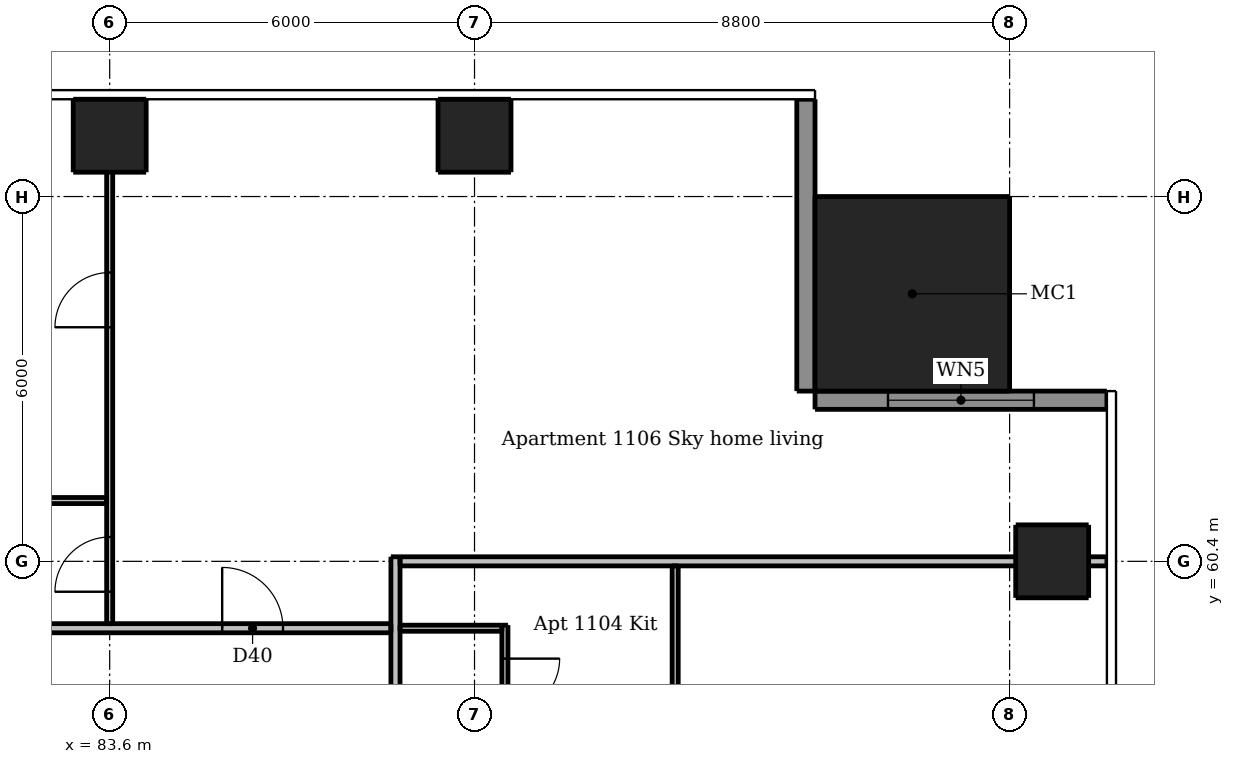
"""IFC4 building model, lengths in metres.
Left out: names, types, materials, properties, quantities, classifications, styles, units other than length and angle.
Written with IfcOpenShell. Run it as: python <this file> out.ifc"""

import sys

from ifc_helpers import new_model, si_unit, direction, frame, frame_2d, origin, origin_2d, place, context, subcontext, project, spatial, rectangle, extrude, element, fill, save


model = new_model("IFC4")
c1 = context("Model", 3, precision=1e-05, world=origin(), true_north=direction((0.0, 1.0)))
c2 = subcontext(c1, "Body", "Model", "MODEL_VIEW")
j1 = project(units=[si_unit("LENGTHUNIT", "METRE"), si_unit("PLANEANGLEUNIT", "RADIAN")], contexts=[c1])
p1 = place(None, origin())
s1 = spatial("IfcSite", under=j1, at=p1, CompositionType="ELEMENT")
p2 = place(p1, origin())
s2 = spatial("IfcBuilding", under=s1, at=p2, CompositionType="ELEMENT")
p3 = place(p2, frame((0.0, 0.0, 43.3)))
s3 = spatial("IfcBuildingStorey", under=s2, at=p3, CompositionType="ELEMENT", Elevation=43.3)
for number, where, z_axis, x_axis in (
    (1, (99.1, 60.4, 0.0), (0.0, 0.0, 1.0), (1.0, 0.0, 0.0)),
    (2, (83.6, 67.4, 0.0), (0.0, 0.0, 1.0), (1.0, 0.0, 0.0)),
    (3, (89.6, 67.4, 0.0), (0.0, 0.0, 1.0), (1.0, 0.0, 0.0)),
):
    element("IfcColumn", number, at=place(p3, frame(where, z_axis=z_axis, x_axis=x_axis)), inside=s3, PredefinedType="COLUMN", context=c2, shape_type="SweptSolid", body=[
        extrude(rectangle(XDim=1.2, YDim=1.2, at=origin_2d()), origin(), (0.0, 0.0, 1.0), 3.05),
    ])
p4 = place(p3, frame((96.8, 64.8, 0.0), z_axis=(0.0, 0.0, 1.0), x_axis=(1.0, 0.0, 0.0)))
e4 = element("IfcColumn", 4, at=p4, inside=s3, PredefinedType="COLUMN", context=c2, shape_type="SweptSolid", body=[
    extrude(rectangle(XDim=3.2, YDim=3.2, at=origin_2d()), origin(), (0.0, 0.0, 1.0), 3.3),
])
p5 = place(p3, frame((100.0, 63.05, 0.0), z_axis=(0.0, 0.0, 1.0), x_axis=(-1.0, 0.0, 0.0)))
e5 = element("IfcWall", 5, at=p5, inside=s3, PredefinedType="SOLIDWALL", context=c2, shape_type="SweptSolid", body=[
    extrude(rectangle(XDim=4.8, YDim=0.3, at=frame_2d((2.4, 0.0))), origin(), (0.0, 0.0, 1.0), 3.05),
])
p6 = place(p5, frame((1.2, 0.0, 0.15)))
e6 = element("IfcOpeningElement", 6, at=p6, cuts=e5, PredefinedType="OPENING", context=c2, shape_type="SweptSolid", body=[
    extrude(rectangle(XDim=2.4, YDim=2.1, at=frame_2d((1.2, 1.05))), frame((0.0, 0.16, 0.0), z_axis=(0.0, -1.0, 0.0), x_axis=(1.0, 0.0, 0.0)), (0.0, 0.0, 1.0), 0.32),
])
p7 = place(p3, frame((95.05, 63.2, 0.0), z_axis=(0.0, 0.0, 1.0), x_axis=(0.0, 1.0, 0.0)))
e7 = element("IfcWall", 7, at=p7, inside=s3, PredefinedType="SOLIDWALL", context=c2, shape_type="SweptSolid", body=[
    extrude(rectangle(XDim=4.8, YDim=0.3, at=frame_2d((2.4, 0.0))), origin(), (0.0, 0.0, 1.0), 3.05),
])
p8 = place(p3, frame((83.6, 59.375, 0.0), z_axis=(0.0, 0.0, 1.0), x_axis=(0.0, 1.0, 0.0)))
e8 = element("IfcWall", 8, at=p8, inside=s3, PredefinedType="PARTITIONING", context=c2, shape_type="SweptSolid", body=[
    extrude(rectangle(XDim=8.625, YDim=0.1, at=frame_2d((4.312, 0.0))), origin(), (0.0, 0.0, 1.0), 2.516),
])
p9 = place(p8, frame((0.525, 0.0, 0.0)))
e9 = element("IfcOpeningElement", 9, at=p9, cuts=e8, PredefinedType="OPENING", context=c2, shape_type="SweptSolid", body=[
    extrude(rectangle(XDim=0.9, YDim=2.1, at=frame_2d((0.45, 1.05))), frame((0.0, 0.06, 0.0), z_axis=(0.0, -1.0, 0.0), x_axis=(1.0, 0.0, 0.0)), (0.0, 0.0, 1.0), 0.12),
])
p10 = place(p8, frame((4.875, 0.0, 0.0)))
e10 = element("IfcOpeningElement", 10, at=p10, cuts=e8, PredefinedType="OPENING", context=c2, shape_type="SweptSolid", body=[
    extrude(rectangle(XDim=0.9, YDim=2.1, at=frame_2d((0.45, 1.05))), frame((0.0, 0.06, 0.0), z_axis=(0.0, -1.0, 0.0), x_axis=(1.0, 0.0, 0.0)), (0.0, 0.0, 1.0), 0.12),
])
p11 = place(p3, frame((90.1, 59.35, 0.0), z_axis=(0.0, 0.0, 1.0), x_axis=(0.0, -1.0, 0.0)))
e11 = element("IfcWall", 11, at=p11, inside=s3, PredefinedType="PARTITIONING", context=c2, shape_type="SweptSolid", body=[
    extrude(rectangle(XDim=19.775, YDim=0.1, at=frame_2d((9.888, 0.0))), origin(), (0.0, 0.0, 1.0), 3.05),
])
p12 = place(p11, frame((4.45, 0.0, 0.0)))
e12 = element("IfcOpeningElement", 12, at=p12, cuts=e11, PredefinedType="OPENING", context=c2, shape_type="SweptSolid", body=[
    extrude(rectangle(XDim=0.9, YDim=2.1, at=frame_2d((0.45, 1.05))), frame((0.0, 0.06, 0.0), z_axis=(0.0, -1.0, 0.0), x_axis=(1.0, 0.0, 0.0)), (0.0, 0.0, 1.0), 0.12),
])
p13 = place(p11, frame((0.55, 0.0, 0.0)))
e13 = element("IfcOpeningElement", 13, at=p13, cuts=e11, PredefinedType="OPENING", context=c2, shape_type="SweptSolid", body=[
    extrude(rectangle(XDim=0.9, YDim=2.1, at=frame_2d((0.45, 1.05))), frame((0.0, 0.06, 0.0), z_axis=(0.0, -1.0, 0.0), x_axis=(1.0, 0.0, 0.0)), (0.0, 0.0, 1.0), 0.12),
])
p14 = place(p11, frame((17.6, 0.0, 0.0)))
e14 = element("IfcOpeningElement", 14, at=p14, cuts=e11, PredefinedType="OPENING", context=c2, shape_type="SweptSolid", body=[
    extrude(rectangle(XDim=0.9, YDim=2.1, at=frame_2d((0.45, 1.05))), frame((0.0, 0.06, 0.0), z_axis=(0.0, -1.0, 0.0), x_axis=(1.0, 0.0, 0.0)), (0.0, 0.0, 1.0), 0.12),
])
p15 = place(p11, frame((11.6, 0.0, 0.0)))
e15 = element("IfcOpeningElement", 15, at=p15, cuts=e11, PredefinedType="OPENING", context=c2, shape_type="SweptSolid", body=[
    extrude(rectangle(XDim=0.9, YDim=2.1, at=frame_2d((0.45, 1.05))), frame((0.0, 0.06, 0.0), z_axis=(0.0, -1.0, 0.0), x_axis=(1.0, 0.0, 0.0)), (0.0, 0.0, 1.0), 0.12),
])
p16 = place(p11, frame((14.65, 0.0, 0.0)))
e16 = element("IfcOpeningElement", 16, at=p16, cuts=e11, PredefinedType="OPENING", context=c2, shape_type="SweptSolid", body=[
    extrude(rectangle(XDim=0.8, YDim=2.1, at=frame_2d((0.4, 1.05))), frame((0.0, 0.06, 0.0), z_axis=(0.0, -1.0, 0.0), x_axis=(1.0, 0.0, 0.0)), (0.0, 0.0, 1.0), 0.12),
])
p17 = place(p11, frame((8.65, 0.0, 0.0)))
e17 = element("IfcOpeningElement", 17, at=p17, cuts=e11, PredefinedType="OPENING", context=c2, shape_type="SweptSolid", body=[
    extrude(rectangle(XDim=0.8, YDim=2.1, at=frame_2d((0.4, 1.05))), frame((0.0, 0.06, 0.0), z_axis=(0.0, -1.0, 0.0), x_axis=(1.0, 0.0, 0.0)), (0.0, 0.0, 1.0), 0.12),
])
p18 = place(p3, frame((92.9, 57.35, 0.0), z_axis=(0.0, 0.0, 1.0), x_axis=(0.0, 1.0, 0.0)))
e18 = element("IfcWall", 18, at=p18, inside=s3, PredefinedType="PARTITIONING", context=c2, shape_type="SweptSolid", body=[
    extrude(rectangle(XDim=2.975, YDim=0.1, at=frame_2d((1.487, 0.0))), origin(), (0.0, 0.0, 1.0), 3.05),
])
p19 = place(p3, frame((83.55, 61.4, 0.0), z_axis=(0.0, 0.0, 1.0), x_axis=(-1.0, 0.0, 0.0)))
e19 = element("IfcWall", 19, at=p19, inside=s3, PredefinedType="PARTITIONING", context=c2, shape_type="SweptSolid", body=[
    extrude(rectangle(XDim=5.875, YDim=0.1, at=frame_2d((2.938, 0.0))), origin(), (0.0, 0.0, 1.0), 3.05),
])
p20 = place(p19, frame((3.75, 0.0, 0.0)))
e20 = element("IfcOpeningElement", 20, at=p20, cuts=e19, PredefinedType="OPENING", context=c2, shape_type="SweptSolid", body=[
    extrude(rectangle(XDim=0.8, YDim=2.1, at=frame_2d((0.4, 1.05))), frame((0.0, 0.06, 0.0), z_axis=(0.0, -1.0, 0.0), x_axis=(1.0, 0.0, 0.0)), (0.0, 0.0, 1.0), 0.12),
])
p21 = place(p3, frame((88.375, 59.3, 0.0), z_axis=(0.0, 0.0, 1.0), x_axis=(1.0, 0.0, 0.0)))
e21 = element("IfcWall", 21, at=p21, inside=s3, PredefinedType="PARTITIONING", context=c2, shape_type="SweptSolid", body=[
    extrude(rectangle(XDim=1.675, YDim=0.1, at=frame_2d((0.837, 0.0))), origin(), (0.0, 0.0, 1.0), 3.05),
])
p22 = place(p3, frame((88.3, 60.475, 0.0), z_axis=(0.0, 0.0, 1.0), x_axis=(0.0, -1.0, 0.0)))
e22 = element("IfcWall", 22, at=p22, inside=s3, PredefinedType="PARTITIONING", context=c2, shape_type="SweptSolid", body=[
    extrude(rectangle(XDim=28.7, YDim=0.15, at=frame_2d((14.35, 0.0))), origin(), (0.0, 0.0, 1.0), 3.05),
])
p23 = place(p22, frame((27.425, 0.0, 0.0)))
e23 = element("IfcOpeningElement", 23, at=p23, cuts=e22, PredefinedType="OPENING", context=c2, shape_type="SweptSolid", body=[
    extrude(rectangle(XDim=1.0, YDim=2.1, at=frame_2d((0.5, 1.05))), frame((0.0, 0.085, 0.0), z_axis=(0.0, -1.0, 0.0), x_axis=(1.0, 0.0, 0.0)), (0.0, 0.0, 1.0), 0.17),
])
p24 = place(p22, frame((10.575, 0.0, 0.0)))
e24 = element("IfcOpeningElement", 24, at=p24, cuts=e22, PredefinedType="OPENING", context=c2, shape_type="SweptSolid", body=[
    extrude(rectangle(XDim=1.0, YDim=2.1, at=frame_2d((0.5, 1.05))), frame((0.0, 0.085, 0.0), z_axis=(0.0, -1.0, 0.0), x_axis=(1.0, 0.0, 0.0)), (0.0, 0.0, 1.0), 0.17),
])
p25 = place(p3, frame((88.375, 60.4, 0.0), z_axis=(0.0, 0.0, 1.0), x_axis=(1.0, 0.0, 0.0)))
e25 = element("IfcWall", 25, at=p25, inside=s3, PredefinedType="PARTITIONING", context=c2, shape_type="SweptSolid", body=[
    extrude(rectangle(XDim=11.625, YDim=0.15, at=frame_2d((5.812, 0.0))), origin(), (0.0, 0.0, 1.0), 2.516),
])
p26 = place(p3, frame((59.675, 59.3, 0.0), z_axis=(0.0, 0.0, 1.0), x_axis=(1.0, 0.0, 0.0)))
e26 = element("IfcWall", 26, at=p26, inside=s3, PredefinedType="PARTITIONING", context=c2, shape_type="SweptSolid", body=[
    extrude(rectangle(XDim=28.55, YDim=0.15, at=frame_2d((14.275, 0.0))), origin(), (0.0, 0.0, 1.0), 3.05),
])
p27 = place(p26, frame((8.975, 0.0, 0.0)))
e27 = element("IfcOpeningElement", 27, at=p27, cuts=e26, PredefinedType="OPENING", context=c2, shape_type="SweptSolid", body=[
    extrude(rectangle(XDim=1.0, YDim=2.1, at=frame_2d((0.5, 1.05))), frame((0.0, 0.085, 0.0), z_axis=(0.0, -1.0, 0.0), x_axis=(1.0, 0.0, 0.0)), (0.0, 0.0, 1.0), 0.17),
])
p28 = place(p26, frame((25.775, 0.0, 0.0)))
e28 = element("IfcOpeningElement", 28, at=p28, cuts=e26, PredefinedType="OPENING", context=c2, shape_type="SweptSolid", body=[
    extrude(rectangle(XDim=1.0, YDim=2.1, at=frame_2d((0.5, 1.05))), frame((0.0, 0.085, 0.0), z_axis=(0.0, -1.0, 0.0), x_axis=(1.0, 0.0, 0.0)), (0.0, 0.0, 1.0), 0.17),
])
p29 = place(p6, origin())
e29 = element("IfcWindow", 29, at=p29, inside=s3, PartitioningType="DOUBLE_PANEL_VERTICAL", PredefinedType="WINDOW", context=c2, shape_type="SweptSolid", body=[
    extrude(rectangle(XDim=2.4, YDim=2.1, at=frame_2d((1.2, 1.05))), frame((0.0, 0.03, 0.0), z_axis=(0.0, -1.0, 0.0), x_axis=(1.0, 0.0, 0.0)), (0.0, 0.0, 1.0), 0.06),
])
fill(e6, e29)
p30 = place(p13, origin())
e30 = element("IfcDoor", 30, at=p30, inside=s3, OperationType="SINGLE_SWING_LEFT", PredefinedType="DOOR", context=c2, shape_type="SweptSolid", body=[
    extrude(rectangle(XDim=0.9, YDim=2.1, at=frame_2d((0.45, 1.05))), frame((0.0, 0.025, 0.0), z_axis=(0.0, -1.0, 0.0), x_axis=(1.0, 0.0, 0.0)), (0.0, 0.0, 1.0), 0.05),
])
fill(e13, e30)
p31 = place(p28, origin())
e31 = element("IfcDoor", 31, at=p31, inside=s3, OperationType="SINGLE_SWING_LEFT", PredefinedType="DOOR", context=c2, shape_type="SweptSolid", body=[
    extrude(rectangle(XDim=1.0, YDim=2.1, at=frame_2d((0.5, 1.05))), frame((0.0, 0.025, 0.0), z_axis=(0.0, -1.0, 0.0), x_axis=(1.0, 0.0, 0.0)), (0.0, 0.0, 1.0), 0.05),
])
fill(e28, e31)
p32 = place(p9, origin())
e32 = element("IfcDoor", 32, at=p32, inside=s3, OperationType="SINGLE_SWING_LEFT", PredefinedType="DOOR", context=c2, shape_type="SweptSolid", body=[
    extrude(rectangle(XDim=0.9, YDim=2.1, at=frame_2d((0.45, 1.05))), frame((0.0, 0.025, 0.0), z_axis=(0.0, -1.0, 0.0), x_axis=(1.0, 0.0, 0.0)), (0.0, 0.0, 1.0), 0.05),
])
fill(e9, e32)
p33 = place(p10, origin())
e33 = element("IfcDoor", 33, at=p33, inside=s3, OperationType="SINGLE_SWING_LEFT", PredefinedType="DOOR", context=c2, shape_type="SweptSolid", body=[
    extrude(rectangle(XDim=0.9, YDim=2.1, at=frame_2d((0.45, 1.05))), frame((0.0, 0.025, 0.0), z_axis=(0.0, -1.0, 0.0), x_axis=(1.0, 0.0, 0.0)), (0.0, 0.0, 1.0), 0.05),
])
fill(e10, e33)
save(model, sys.argv[1])
